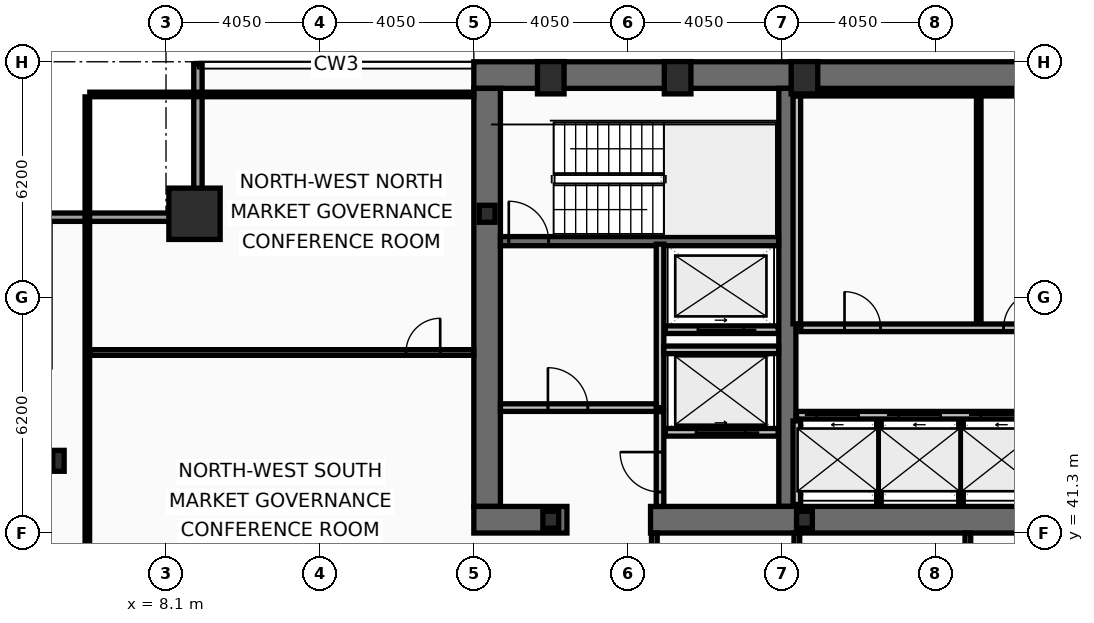
"""IFC4 building model, lengths in metres.
Left out: names, types, materials, properties, quantities, classifications, styles, units other than length and angle.
Written with IfcOpenShell. Run it as: python <this file> out.ifc"""

import sys

from ifc_helpers import new_model, si_unit, direction, frame, frame_2d, origin, origin_2d, place, context, subcontext, project, spatial, rectangle, hollow_rectangle, i_section, extrude, element, fill, save


model = new_model("IFC4")
c1 = context("Model", 3, precision=1e-05, world=origin(), true_north=direction((0.0, 1.0)))
c2 = subcontext(c1, "Body", "Model", "MODEL_VIEW")
j1 = project(units=[si_unit("LENGTHUNIT", "METRE"), si_unit("PLANEANGLEUNIT", "RADIAN")], contexts=[c1])
p1 = place(None, origin())
s1 = spatial("IfcSite", under=j1, at=p1, CompositionType="ELEMENT")
p2 = place(p1, origin())
s2 = spatial("IfcBuilding", under=s1, at=p2, CompositionType="ELEMENT")
p3 = place(p2, frame((0.0, 0.0, 165.0)))
s3 = spatial("IfcBuildingStorey", under=s2, at=p3, CompositionType="ELEMENT", Elevation=165.0)
p4 = place(p3, frame((16.2, 53.35, 0.0), z_axis=(0.0, 0.0, 1.0), x_axis=(1.0, 0.0, 0.0)))
e1 = element("IfcWall", 1, at=p4, inside=s3, PredefinedType="SHEAR", context=c2, shape_type="SweptSolid", body=[
    extrude(rectangle(XDim=40.5, YDim=0.7, at=frame_2d((20.25, 0.0))), origin(), (0.0, 0.0, 1.0), 3.44),
])
p5 = place(p3, frame((16.55, 42.0, 0.0), z_axis=(0.0, 0.0, 1.0), x_axis=(0.0, 1.0, 0.0)))
e2 = element("IfcWall", 2, at=p5, inside=s3, PredefinedType="SHEAR", context=c2, shape_type="SweptSolid", body=[
    extrude(rectangle(XDim=11.0, YDim=0.7, at=frame_2d((5.5, 0.0))), origin(), (0.0, 0.0, 1.0), 3.44),
])
p6 = place(p3, frame((24.45, 42.0, 0.0), z_axis=(0.0, 0.0, 1.0), x_axis=(0.0, 1.0, 0.0)))
e3 = element("IfcWall", 3, at=p6, inside=s3, PredefinedType="SHEAR", context=c2, shape_type="SweptSolid", body=[
    extrude(rectangle(XDim=11.0, YDim=0.45, at=frame_2d((5.5, 0.0))), origin(), (0.0, 0.0, 1.0), 3.44),
])
p7 = place(p3, frame((18.65, 41.65, 0.0), z_axis=(0.0, 0.0, 1.0), x_axis=(-1.0, 0.0, 0.0)))
e4 = element("IfcWall", 4, at=p7, inside=s3, PredefinedType="SHEAR", context=c2, shape_type="SweptSolid", body=[
    extrude(rectangle(XDim=2.45, YDim=0.7, at=frame_2d((1.225, 0.0))), origin(), (0.0, 0.0, 1.0), 3.44),
])
p8 = place(p3, frame((32.3, 41.65, 0.0), z_axis=(0.0, 0.0, 1.0), x_axis=(-1.0, 0.0, 0.0)))
e5 = element("IfcWall", 5, at=p8, inside=s3, PredefinedType="SHEAR", context=c2, shape_type="SweptSolid", body=[
    extrude(rectangle(XDim=11.45, YDim=0.7, at=frame_2d((5.725, 0.0))), origin(), (0.0, 0.0, 1.0), 3.44),
])
p9 = place(p3, frame((16.9, 48.98, 0.0), z_axis=(0.0, 0.0, 1.0), x_axis=(1.0, 0.0, 0.0)))
e6 = element("IfcWall", 6, at=p9, inside=s3, PredefinedType="SHEAR", context=c2, shape_type="SweptSolid", body=[
    extrude(rectangle(XDim=7.32, YDim=0.24, at=frame_2d((3.66, 0.0))), origin(), (0.0, 0.0, 1.0), 3.44),
])
p10 = place(p9, frame((0.22, 0.0, 0.0)))
e7 = element("IfcOpeningElement", 7, at=p10, cuts=e6, PredefinedType="OPENING", context=c2, shape_type="SweptSolid", body=[
    extrude(rectangle(XDim=1.05, YDim=2.15, at=frame_2d((0.525, 1.075))), frame((0.0, 0.13, 0.0), z_axis=(0.0, -1.0, 0.0), x_axis=(1.0, 0.0, 0.0)), (0.0, 0.0, 1.0), 0.26),
])
p11 = place(p3, frame((8.85, 49.7, 0.0), z_axis=(0.0, 0.0, 1.0), x_axis=(1.0, 0.0, 0.0)))
e8 = element("IfcColumn", 8, at=p11, inside=s3, PredefinedType="COLUMN", context=c2, shape_type="SweptSolid", body=[
    extrude(hollow_rectangle(XDim=1.35, YDim=1.35, WallThickness=0.065, at=origin_2d()), origin(), (0.0, 0.0, 1.0), 3.6),
])
for number, where, z_axis, x_axis in (
    (9, (18.225, 53.28, 0.0), (0.0, 0.0, 1.0), (1.0, 0.0, 0.0)),
    (10, (21.562, 53.28, 0.0), (0.0, 0.0, 1.0), (1.0, 0.0, 0.0)),
    (11, (24.9, 53.28, 0.0), (0.0, 0.0, 1.0), (1.0, 0.0, 0.0)),
):
    element("IfcColumn", number, at=place(p3, frame(where, z_axis=z_axis, x_axis=x_axis)), inside=s3, PredefinedType="COLUMN", context=c2, shape_type="SweptSolid", body=[
        extrude(hollow_rectangle(XDim=0.7, YDim=0.85, WallThickness=0.05, at=origin_2d()), origin(), (0.0, 0.0, 1.0), 3.6),
    ])
p12 = place(p3, frame((5.27, 43.2, 0.0), z_axis=(0.0, 0.0, 1.0), x_axis=(1.0, 0.0, 0.0)))
e12 = element("IfcColumn", 12, at=p12, inside=s3, PredefinedType="COLUMN", context=c2, shape_type="SweptSolid", body=[
    extrude(i_section(OverallWidth=0.3, OverallDepth=0.55, WebThickness=0.015, FlangeThickness=0.029, at=origin_2d()), origin(), (0.0, 0.0, 1.0), 3.6),
])
for number, where, z_axis, x_axis in (
    (13, (16.55, 49.7, 0.0), (0.0, 0.0, 1.0), (1.0, 0.0, 0.0)),
    (14, (18.225, 41.65, 0.0), (0.0, 0.0, 1.0), (1.0, 0.0, 0.0)),
    (15, (24.9, 41.65, 0.0), (0.0, 0.0, 1.0), (1.0, 0.0, 0.0)),
):
    element("IfcColumn", number, at=place(p3, frame(where, z_axis=z_axis, x_axis=x_axis)), inside=s3, PredefinedType="COLUMN", context=c2, shape_type="SweptSolid", body=[
        extrude(i_section(OverallWidth=0.416, OverallDepth=0.446, WebThickness=0.039, FlangeThickness=0.063, at=origin_2d()), origin(), (0.0, 0.0, 1.0), 3.6),
    ])
p13 = place(p3, frame((4.83, 49.61, 0.0), z_axis=(0.0, 0.0, 1.0), x_axis=(1.0, 0.0, 0.0)))
e16 = element("IfcWall", 16, at=p13, inside=s3, PredefinedType="SOLIDWALL", context=c2, shape_type="SweptSolid", body=[
    extrude(rectangle(XDim=4.22, YDim=0.22, at=frame_2d((2.11, 0.0))), origin(), (0.0, 0.0, 1.0), 2.83),
])
p14 = place(p3, frame((8.94, 49.72, 0.0), z_axis=(0.0, 0.0, 1.0), x_axis=(0.0, 1.0, 0.0)))
e17 = element("IfcWall", 17, at=p14, inside=s3, PredefinedType="SOLIDWALL", context=c2, shape_type="SweptSolid", body=[
    extrude(rectangle(XDim=3.91, YDim=0.22, at=frame_2d((1.955, 0.0))), origin(), (0.0, 0.0, 1.0), 2.83),
])
p15 = place(p3, frame((24.69, 44.4, 0.0), z_axis=(0.0, 0.0, 1.0), x_axis=(1.0, 0.0, 0.0)))
e18 = element("IfcWall", 18, at=p15, inside=s3, PredefinedType="PARTITIONING", context=c2, shape_type="SweptSolid", body=[
    extrude(rectangle(XDim=6.53, YDim=0.2, at=frame_2d((3.265, 0.0))), origin(), (0.0, 0.0, 1.0), 3.44),
])
p16 = place(p15, frame((0.53, 0.0, 0.0)))
e19 = element("IfcOpeningElement", 19, at=p16, cuts=e18, PredefinedType="OPENING", context=c2, shape_type="SweptSolid", body=[
    extrude(rectangle(XDim=1.1, YDim=2.18, at=frame_2d((0.55, 1.09))), frame((0.0, 0.11, 0.0), z_axis=(0.0, -1.0, 0.0), x_axis=(1.0, 0.0, 0.0)), (0.0, 0.0, 1.0), 0.22),
])
p17 = place(p15, frame((2.69, 0.0, 0.0)))
e20 = element("IfcOpeningElement", 20, at=p17, cuts=e18, PredefinedType="OPENING", context=c2, shape_type="SweptSolid", body=[
    extrude(rectangle(XDim=1.1, YDim=2.18, at=frame_2d((0.55, 1.09))), frame((0.0, 0.11, 0.0), z_axis=(0.0, -1.0, 0.0), x_axis=(1.0, 0.0, 0.0)), (0.0, 0.0, 1.0), 0.22),
])
p18 = place(p15, frame((4.85, 0.0, 0.0)))
e21 = element("IfcOpeningElement", 21, at=p18, cuts=e18, PredefinedType="OPENING", context=c2, shape_type="SweptSolid", body=[
    extrude(rectangle(XDim=1.1, YDim=2.18, at=frame_2d((0.55, 1.09))), frame((0.0, 0.11, 0.0), z_axis=(0.0, -1.0, 0.0), x_axis=(1.0, 0.0, 0.0)), (0.0, 0.0, 1.0), 0.22),
])
p19 = place(p3, frame((24.21, 43.95, 0.0), z_axis=(0.0, 0.0, 1.0), x_axis=(-1.0, 0.0, 0.0)))
e22 = element("IfcWall", 22, at=p19, inside=s3, PredefinedType="PARTITIONING", context=c2, shape_type="SweptSolid", body=[
    extrude(rectangle(XDim=2.97, YDim=0.2, at=frame_2d((1.485, 0.0))), origin(), (0.0, 0.0, 1.0), 3.44),
])
p20 = place(p19, frame((0.86, 0.0, 0.0)))
e23 = element("IfcOpeningElement", 23, at=p20, cuts=e22, PredefinedType="OPENING", context=c2, shape_type="SweptSolid", body=[
    extrude(rectangle(XDim=1.3, YDim=2.18, at=frame_2d((0.65, 1.09))), frame((0.0, 0.11, 0.0), z_axis=(0.0, -1.0, 0.0), x_axis=(1.0, 0.0, 0.0)), (0.0, 0.0, 1.0), 0.22),
])
p21 = place(p3, frame((24.21, 46.65, 0.0), z_axis=(0.0, 0.0, 1.0), x_axis=(-1.0, 0.0, 0.0)))
e24 = element("IfcWall", 24, at=p21, inside=s3, PredefinedType="PARTITIONING", context=c2, shape_type="SweptSolid", body=[
    extrude(rectangle(XDim=2.97, YDim=0.2, at=frame_2d((1.485, 0.0))), origin(), (0.0, 0.0, 1.0), 3.44),
])
p22 = place(p21, frame((0.91, 0.0, 0.0)))
e25 = element("IfcOpeningElement", 25, at=p22, cuts=e24, PredefinedType="OPENING", context=c2, shape_type="SweptSolid", body=[
    extrude(rectangle(XDim=1.2, YDim=2.18, at=frame_2d((0.6, 1.09))), frame((0.0, 0.11, 0.0), z_axis=(0.0, -1.0, 0.0), x_axis=(1.0, 0.0, 0.0)), (0.0, 0.0, 1.0), 0.22),
])
p23 = place(p3, frame((21.1, 44.6, 0.0), z_axis=(0.0, 0.0, 1.0), x_axis=(0.0, 1.0, 0.0)))
e26 = element("IfcWall", 26, at=p23, inside=s3, PredefinedType="PARTITIONING", context=c2, shape_type="SweptSolid", body=[
    extrude(rectangle(XDim=4.3, YDim=0.2, at=frame_2d((2.15, 0.0))), origin(), (0.0, 0.0, 1.0), 3.44),
])
p24 = place(p3, frame((16.9, 44.6, 0.0), z_axis=(0.0, 0.0, 1.0), x_axis=(1.0, 0.0, 0.0)))
e27 = element("IfcWall", 27, at=p24, inside=s3, PredefinedType="PARTITIONING", context=c2, shape_type="SweptSolid", body=[
    extrude(rectangle(XDim=4.1, YDim=0.2, at=frame_2d((2.05, 0.0))), origin(), (0.0, 0.0, 1.0), 3.44),
])
p25 = place(p24, frame((1.25, 0.0, 0.0)))
e28 = element("IfcOpeningElement", 28, at=p25, cuts=e27, PredefinedType="OPENING", context=c2, shape_type="SweptSolid", body=[
    extrude(rectangle(XDim=1.05, YDim=2.15, at=frame_2d((0.525, 1.075))), frame((0.0, 0.11, 0.0), z_axis=(0.0, -1.0, 0.0), x_axis=(1.0, 0.0, 0.0)), (0.0, 0.0, 1.0), 0.22),
])
p26 = place(p3, frame((21.2, 46.12, 0.0), z_axis=(0.0, 0.0, 1.0), x_axis=(1.0, 0.0, 0.0)))
e29 = element("IfcWall", 29, at=p26, inside=s3, PredefinedType="PARTITIONING", context=c2, shape_type="SweptSolid", body=[
    extrude(rectangle(XDim=3.02, YDim=0.2, at=frame_2d((1.51, 0.0))), origin(), (0.0, 0.0, 1.0), 3.44),
])
p27 = place(p3, frame((21.1, 42.0, 0.0), z_axis=(0.0, 0.0, 1.0), x_axis=(0.0, 1.0, 0.0)))
e30 = element("IfcWall", 30, at=p27, inside=s3, PredefinedType="PARTITIONING", context=c2, shape_type="SweptSolid", body=[
    extrude(rectangle(XDim=2.495, YDim=0.2, at=frame_2d((1.248, 0.0))), origin(), (0.0, 0.0, 1.0), 3.44),
])
p28 = place(p27, frame((0.38, 0.0, 0.0)))
e31 = element("IfcOpeningElement", 31, at=p28, cuts=e30, PredefinedType="OPENING", context=c2, shape_type="SweptSolid", body=[
    extrude(rectangle(XDim=1.05, YDim=2.15, at=frame_2d((0.525, 1.075))), frame((0.0, 0.11, 0.0), z_axis=(0.0, -1.0, 0.0), x_axis=(1.0, 0.0, 0.0)), (0.0, 0.0, 1.0), 0.22),
])
p29 = place(p3, frame((24.7, 46.805, 0.0), z_axis=(0.0, 0.0, 1.0), x_axis=(0.0, 1.0, 0.0)))
e32 = element("IfcWall", 32, at=p29, inside=s3, PredefinedType="PARTITIONING", context=c2, shape_type="SweptSolid", body=[
    extrude(rectangle(XDim=5.99, YDim=0.2, at=frame_2d((2.995, 0.0))), origin(), (0.0, 0.0, 1.0), 3.44),
])
p30 = place(p3, frame((24.805, 52.86, 0.0), z_axis=(0.0, 0.0, 1.0), x_axis=(1.0, 0.0, 0.0)))
e33 = element("IfcWall", 33, at=p30, inside=s3, PredefinedType="PARTITIONING", context=c2, shape_type="SweptSolid", body=[
    extrude(rectangle(XDim=7.51, YDim=0.12, at=frame_2d((3.755, 0.0))), origin(), (0.0, 0.0, 1.0), 3.44),
])
p31 = place(p3, frame((29.486, 46.805, 0.0), z_axis=(0.0, 0.0, 1.0), x_axis=(0.0, 1.0, 0.0)))
e34 = element("IfcWall", 34, at=p31, inside=s3, PredefinedType="PARTITIONING", context=c2, shape_type="SweptSolid", body=[
    extrude(rectangle(XDim=5.99, YDim=0.12, at=frame_2d((2.995, 0.0))), origin(), (0.0, 0.0, 1.0), 3.44),
])
p32 = place(p3, frame((24.805, 46.7, 0.0), z_axis=(0.0, 0.0, 1.0), x_axis=(1.0, 0.0, 0.0)))
e35 = element("IfcWall", 35, at=p32, inside=s3, PredefinedType="PARTITIONING", context=c2, shape_type="SweptSolid", body=[
    extrude(rectangle(XDim=7.51, YDim=0.2, at=frame_2d((3.755, 0.0))), origin(), (0.0, 0.0, 1.0), 3.44),
])
p33 = place(p32, frame((1.15, 0.0, 0.0)))
e36 = element("IfcOpeningElement", 36, at=p33, cuts=e35, PredefinedType="OPENING", context=c2, shape_type="SweptSolid", body=[
    extrude(rectangle(XDim=0.95, YDim=2.1, at=frame_2d((0.475, 1.05))), frame((0.0, 0.11, 0.0), z_axis=(0.0, -1.0, 0.0), x_axis=(1.0, 0.0, 0.0)), (0.0, 0.0, 1.0), 0.22),
])
p34 = place(p32, frame((5.336, 0.0, 0.0)))
e37 = element("IfcOpeningElement", 37, at=p34, cuts=e35, PredefinedType="OPENING", context=c2, shape_type="SweptSolid", body=[
    extrude(rectangle(XDim=0.95, YDim=2.1, at=frame_2d((0.475, 1.05))), frame((0.0, 0.11, 0.0), z_axis=(0.0, -1.0, 0.0), x_axis=(1.0, 0.0, 0.0)), (0.0, 0.0, 1.0), 0.22),
])
p35 = place(p3, frame((24.7, 42.05, 0.0), z_axis=(0.0, 0.0, 1.0), x_axis=(0.0, 1.0, 0.0)))
e38 = element("IfcWall", 38, at=p35, inside=s3, PredefinedType="PARTITIONING", context=c2, shape_type="SweptSolid", body=[
    extrude(rectangle(XDim=2.2, YDim=0.2, at=frame_2d((1.1, 0.0))), origin(), (0.0, 0.0, 1.0), 3.44),
])
for number, where, z_axis, x_axis in (
    (39, (26.86, 42.05, 0.0), (0.0, 0.0, 1.0), (0.0, 1.0, 0.0)),
    (40, (29.02, 42.05, 0.0), (0.0, 0.0, 1.0), (0.0, 1.0, 0.0)),
):
    element("IfcWall", number, at=place(p3, frame(where, z_axis=z_axis, x_axis=x_axis)), inside=s3, PredefinedType="PARTITIONING", context=c2, shape_type="SweptSolid", body=[
        extrude(rectangle(XDim=2.2, YDim=0.12, at=frame_2d((1.1, 0.0))), origin(), (0.0, 0.0, 1.0), 3.44),
    ])
p36 = place(p3, frame((20.95, 38.28, 0.0), z_axis=(0.0, 0.0, 1.0), x_axis=(0.0, 1.0, 0.0)))
e41 = element("IfcWall", 41, at=p36, inside=s3, PredefinedType="PARTITIONING", context=c2, shape_type="SweptSolid", body=[
    extrude(rectangle(XDim=3.02, YDim=0.15, at=frame_2d((1.51, 0.0))), origin(), (0.0, 0.0, 1.0), 3.44),
])
p37 = place(p3, frame((24.7, 38.28, 0.0), z_axis=(0.0, 0.0, 1.0), x_axis=(0.0, 1.0, 0.0)))
e42 = element("IfcWall", 42, at=p37, inside=s3, PredefinedType="PARTITIONING", context=c2, shape_type="SweptSolid", body=[
    extrude(rectangle(XDim=3.02, YDim=0.15, at=frame_2d((1.51, 0.0))), origin(), (0.0, 0.0, 1.0), 2.73),
])
p38 = place(p3, frame((29.2, 38.28, 0.0), z_axis=(0.0, 0.0, 1.0), x_axis=(0.0, 1.0, 0.0)))
e43 = element("IfcWall", 43, at=p38, inside=s3, PredefinedType="PARTITIONING", context=c2, shape_type="SweptSolid", body=[
    extrude(rectangle(XDim=3.02, YDim=0.15, at=frame_2d((1.51, 0.0))), origin(), (0.0, 0.0, 1.0), 3.44),
])
p39 = place(p3, frame((6.095, 46.05, 0.0), z_axis=(0.0, 0.0, 1.0), x_axis=(1.0, 0.0, 0.0)))
e44 = element("IfcWall", 44, at=p39, inside=s3, PredefinedType="PARTITIONING", context=c2, shape_type="SweptSolid", body=[
    extrude(rectangle(XDim=10.105, YDim=0.15, at=frame_2d((5.052, 0.0))), origin(), (0.0, 0.0, 1.0), 2.83),
])
p40 = place(p39, frame((8.32, 0.0, 0.0)))
e45 = element("IfcOpeningElement", 45, at=p40, cuts=e44, PredefinedType="OPENING", context=c2, shape_type="SweptSolid", body=[
    extrude(rectangle(XDim=0.9, YDim=2.05, at=frame_2d((0.45, 1.025))), frame((0.0, 0.085, 0.0), z_axis=(0.0, -1.0, 0.0), x_axis=(1.0, 0.0, 0.0)), (0.0, 0.0, 1.0), 0.17),
])
p41 = place(p3, frame((6.03, 10.665, 0.0), z_axis=(0.0, 0.0, 1.0), x_axis=(0.0, 1.0, 0.0)))
e46 = element("IfcWall", 46, at=p41, inside=s3, PredefinedType="PARTITIONING", context=c2, shape_type="SweptSolid", body=[
    extrude(rectangle(XDim=42.11, YDim=0.12, at=frame_2d((21.055, 0.0))), origin(), (0.0, 0.0, 1.0), 2.73),
])
p42 = place(p3, frame((6.095, 52.84, 0.0), z_axis=(0.0, 0.0, 1.0), x_axis=(1.0, 0.0, 0.0)))
e47 = element("IfcWall", 47, at=p42, inside=s3, PredefinedType="PARTITIONING", context=c2, shape_type="SweptSolid", body=[
    extrude(rectangle(XDim=10.105, YDim=0.12, at=frame_2d((5.052, 0.0))), origin(), (0.0, 0.0, 1.0), 3.44),
])
p43 = place(p10, origin())
e48 = element("IfcDoor", 48, at=p43, inside=s3, OperationType="SINGLE_SWING_LEFT", PredefinedType="DOOR", context=c2, shape_type="SweptSolid", body=[
    extrude(rectangle(XDim=1.05, YDim=2.15, at=frame_2d((0.525, 1.075))), frame((0.0, 0.025, 0.0), z_axis=(0.0, -1.0, 0.0), x_axis=(1.0, 0.0, 0.0)), (0.0, 0.0, 1.0), 0.05),
])
fill(e7, e48)
p44 = place(p16, origin())
e49 = element("IfcDoor", 49, at=p44, inside=s3, OperationType="SLIDING_TO_LEFT", PredefinedType="DOOR", context=c2, shape_type="SweptSolid", body=[
    extrude(rectangle(XDim=1.1, YDim=2.18, at=frame_2d((0.55, 1.09))), frame((0.0, 0.025, 0.0), z_axis=(0.0, -1.0, 0.0), x_axis=(1.0, 0.0, 0.0)), (0.0, 0.0, 1.0), 0.05),
])
fill(e19, e49)
p45 = place(p17, origin())
e50 = element("IfcDoor", 50, at=p45, inside=s3, OperationType="SLIDING_TO_LEFT", PredefinedType="DOOR", context=c2, shape_type="SweptSolid", body=[
    extrude(rectangle(XDim=1.1, YDim=2.18, at=frame_2d((0.55, 1.09))), frame((0.0, 0.025, 0.0), z_axis=(0.0, -1.0, 0.0), x_axis=(1.0, 0.0, 0.0)), (0.0, 0.0, 1.0), 0.05),
])
fill(e20, e50)
p46 = place(p18, origin())
e51 = element("IfcDoor", 51, at=p46, inside=s3, OperationType="SLIDING_TO_LEFT", PredefinedType="DOOR", context=c2, shape_type="SweptSolid", body=[
    extrude(rectangle(XDim=1.1, YDim=2.18, at=frame_2d((0.55, 1.09))), frame((0.0, 0.025, 0.0), z_axis=(0.0, -1.0, 0.0), x_axis=(1.0, 0.0, 0.0)), (0.0, 0.0, 1.0), 0.05),
])
fill(e21, e51)
p47 = place(p20, origin())
e52 = element("IfcDoor", 52, at=p47, inside=s3, OperationType="SLIDING_TO_LEFT", PredefinedType="DOOR", context=c2, shape_type="SweptSolid", body=[
    extrude(rectangle(XDim=1.3, YDim=2.18, at=frame_2d((0.65, 1.09))), frame((0.0, 0.025, 0.0), z_axis=(0.0, -1.0, 0.0), x_axis=(1.0, 0.0, 0.0)), (0.0, 0.0, 1.0), 0.05),
])
fill(e23, e52)
p48 = place(p22, origin())
e53 = element("IfcDoor", 53, at=p48, inside=s3, OperationType="SLIDING_TO_LEFT", PredefinedType="DOOR", context=c2, shape_type="SweptSolid", body=[
    extrude(rectangle(XDim=1.2, YDim=2.18, at=frame_2d((0.6, 1.09))), frame((0.0, 0.025, 0.0), z_axis=(0.0, -1.0, 0.0), x_axis=(1.0, 0.0, 0.0)), (0.0, 0.0, 1.0), 0.05),
])
fill(e25, e53)
p49 = place(p25, origin())
e54 = element("IfcDoor", 54, at=p49, inside=s3, OperationType="SINGLE_SWING_LEFT", PredefinedType="DOOR", context=c2, shape_type="SweptSolid", body=[
    extrude(rectangle(XDim=1.05, YDim=2.15, at=frame_2d((0.525, 1.075))), frame((0.0, 0.025, 0.0), z_axis=(0.0, -1.0, 0.0), x_axis=(1.0, 0.0, 0.0)), (0.0, 0.0, 1.0), 0.05),
])
fill(e28, e54)
p50 = place(p28, origin())
e55 = element("IfcDoor", 55, at=p50, inside=s3, OperationType="SINGLE_SWING_RIGHT", PredefinedType="DOOR", context=c2, shape_type="SweptSolid", body=[
    extrude(rectangle(XDim=1.05, YDim=2.15, at=frame_2d((0.525, 1.075))), frame((0.0, 0.025, 0.0), z_axis=(0.0, -1.0, 0.0), x_axis=(1.0, 0.0, 0.0)), (0.0, 0.0, 1.0), 0.05),
])
fill(e31, e55)
p51 = place(p33, origin())
e56 = element("IfcDoor", 56, at=p51, inside=s3, OperationType="SINGLE_SWING_LEFT", PredefinedType="DOOR", context=c2, shape_type="SweptSolid", body=[
    extrude(rectangle(XDim=0.95, YDim=2.1, at=frame_2d((0.475, 1.05))), frame((0.0, 0.025, 0.0), z_axis=(0.0, -1.0, 0.0), x_axis=(1.0, 0.0, 0.0)), (0.0, 0.0, 1.0), 0.05),
])
fill(e36, e56)
p52 = place(p34, origin())
e57 = element("IfcDoor", 57, at=p52, inside=s3, OperationType="SINGLE_SWING_RIGHT", PredefinedType="DOOR", context=c2, shape_type="SweptSolid", body=[
    extrude(rectangle(XDim=0.95, YDim=2.1, at=frame_2d((0.475, 1.05))), frame((0.0, 0.025, 0.0), z_axis=(0.0, -1.0, 0.0), x_axis=(1.0, 0.0, 0.0)), (0.0, 0.0, 1.0), 0.05),
])
fill(e37, e57)
p53 = place(p40, origin())
e58 = element("IfcDoor", 58, at=p53, inside=s3, OperationType="SINGLE_SWING_RIGHT", PredefinedType="DOOR", context=c2, shape_type="SweptSolid", body=[
    extrude(rectangle(XDim=0.9, YDim=2.05, at=frame_2d((0.45, 1.025))), frame((0.0, 0.025, 0.0), z_axis=(0.0, -1.0, 0.0), x_axis=(1.0, 0.0, 0.0)), (0.0, 0.0, 1.0), 0.05),
])
fill(e45, e58)
save(model, sys.argv[1])
